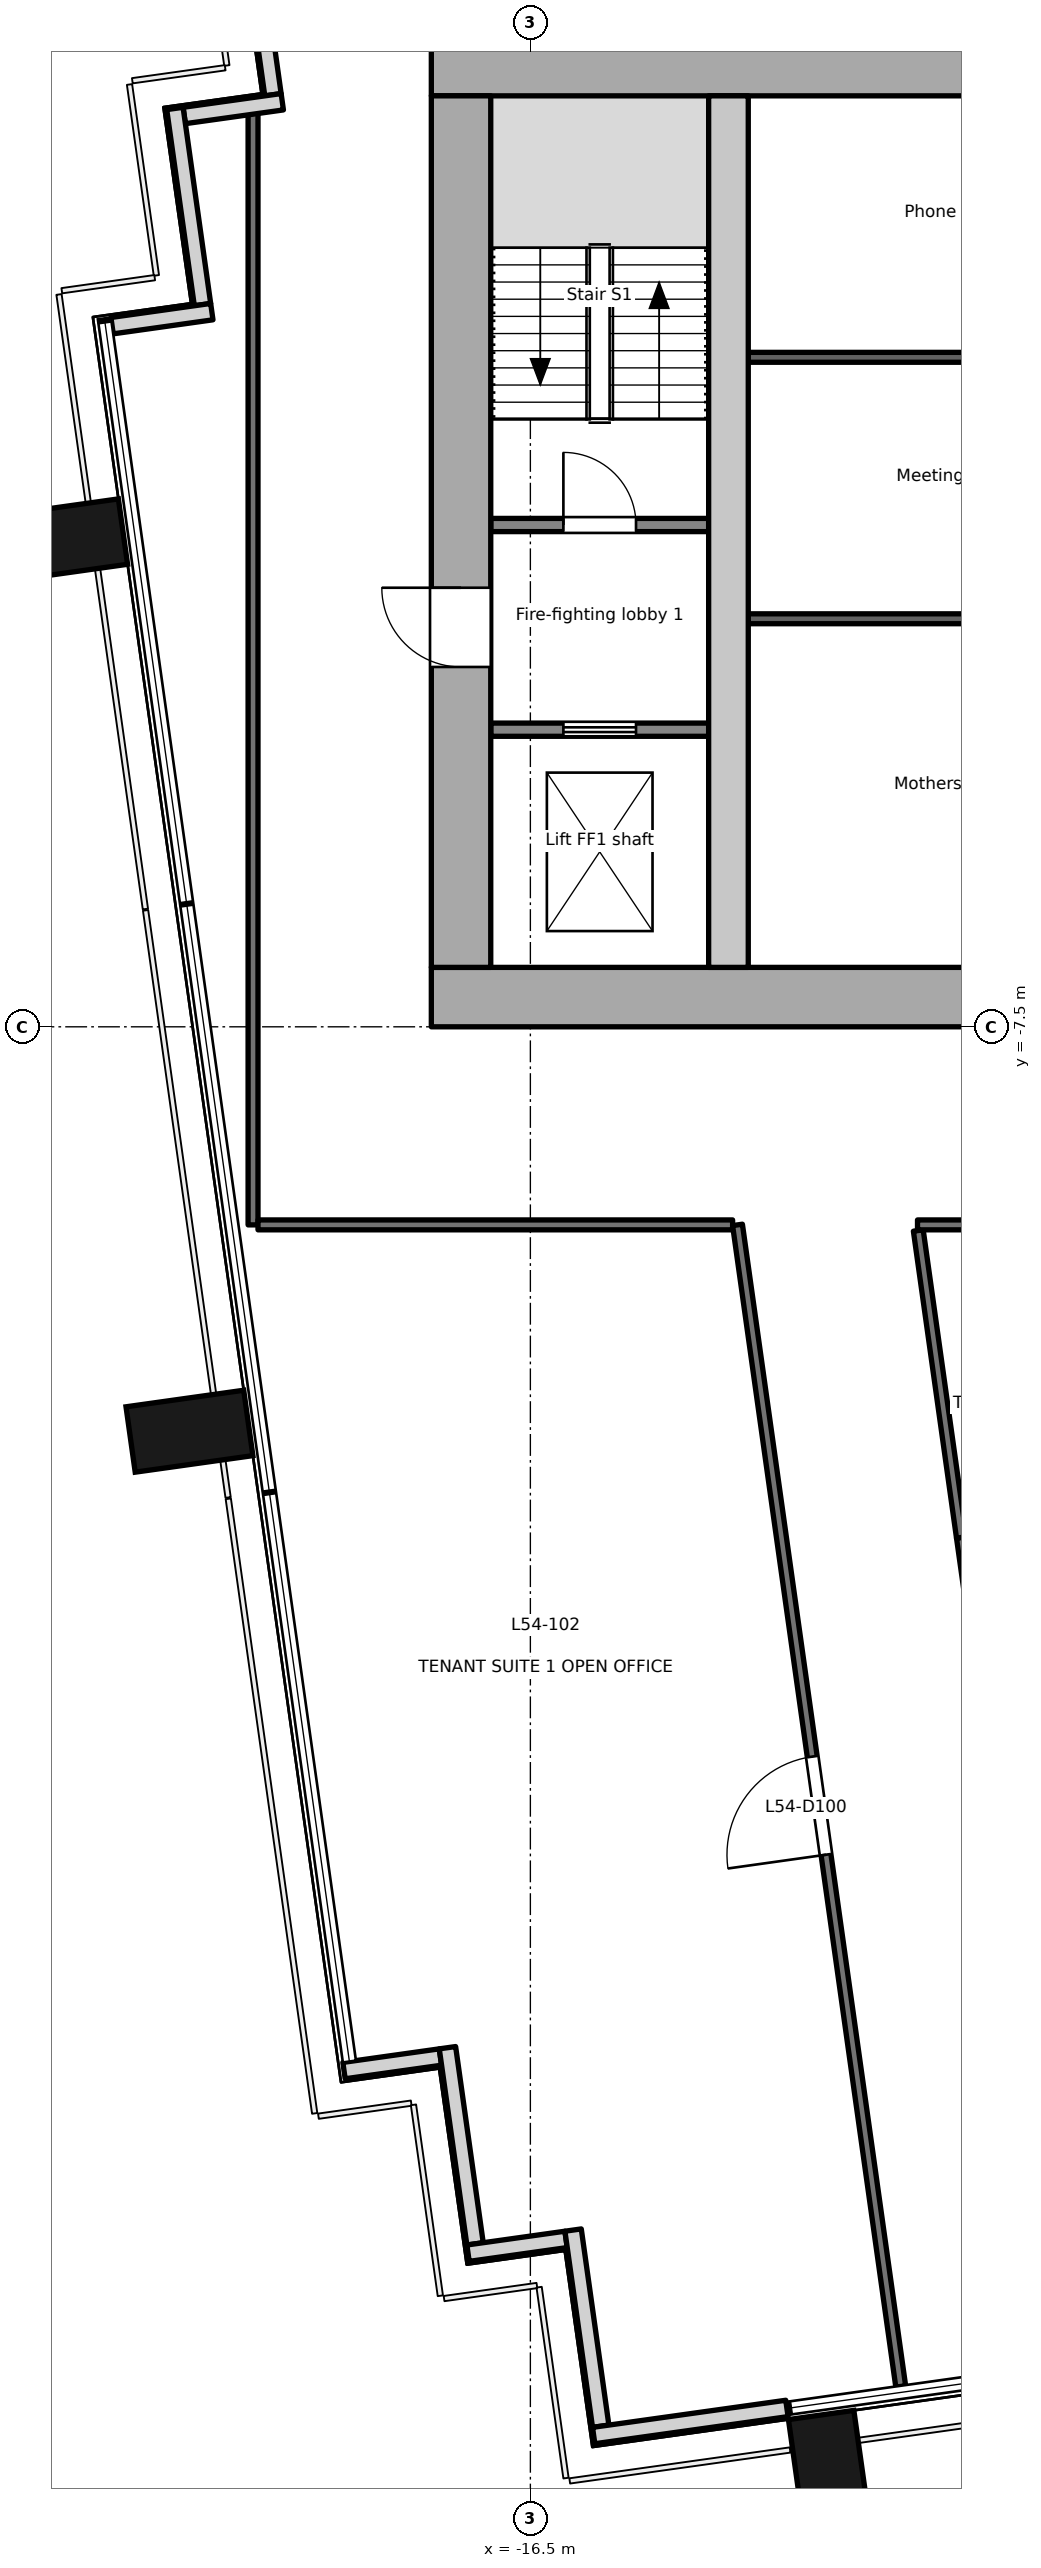
"""IFC4 building model, lengths in metres.
Left out: names, types, materials, properties, quantities, classifications, styles, units other than length and angle.
Written with IfcOpenShell. Run it as: python <this file> out.ifc"""

import sys

from ifc_helpers import new_model, si_unit, direction, frame, frame_2d, origin, origin_2d, place, context, subcontext, project, spatial, rectangle, extrude, element, fill, save


model = new_model("IFC4")
c1 = context("Model", 3, precision=1e-05, world=origin(), true_north=direction((0.0, 1.0)))
c2 = subcontext(c1, "Body", "Model", "MODEL_VIEW")
j1 = project(units=[si_unit("LENGTHUNIT", "METRE"), si_unit("PLANEANGLEUNIT", "RADIAN")], contexts=[c1])
p1 = place(None, origin())
s1 = spatial("IfcSite", under=j1, at=p1, CompositionType="ELEMENT")
p2 = place(p1, origin())
s2 = spatial("IfcBuilding", under=s1, at=p2, CompositionType="ELEMENT")
p3 = place(p2, frame((0.0, 0.0, 236.9)))
s3 = spatial("IfcBuildingStorey", under=s2, at=p3, CompositionType="ELEMENT", Elevation=236.9)
for number, where, z_axis, x_axis in (
    (1, (-11.971, -29.416, -0.2), (0.0, 0.0, 1.0), (0.99, 0.139, 0.0)),
    (2, (-21.663, -13.625, -0.2), (0.0, 0.0, 1.0), (-0.139, 0.99, 0.0)),
    (3, (-23.561, -0.125, -0.2), (0.0, 0.0, 1.0), (-0.139, 0.99, 0.0)),
):
    element("IfcColumn", number, at=place(p3, frame(where, z_axis=z_axis, x_axis=x_axis)), inside=s3, PredefinedType="COLUMN", context=c2, shape_type="SweptSolid", body=[
        extrude(rectangle(XDim=1.0, YDim=1.8, at=origin_2d()), origin(), (0.0, 0.0, 1.0), 3.9),
    ])
p4 = place(p3, frame((-20.815, 9.588, 0.0), z_axis=(0.0, 0.0, 1.0), x_axis=(0.138983028379, -0.9902947631, 0.0)))
e4 = element("IfcWall", 4, at=p4, inside=s3, PredefinedType="SOLIDWALL", context=c2, shape_type="SweptSolid", body=[
    extrude(rectangle(XDim=3.0, YDim=0.25, at=frame_2d((1.5, 0.0))), origin(), (0.0, 0.0, 1.0), 3.7),
])
p5 = place(p3, frame((-20.257, 6.51, 0.0), z_axis=(0.0, 0.0, 1.0), x_axis=(-0.990330117064, -0.138730887823, 0.0)))
e5 = element("IfcWall", 5, at=p5, inside=s3, PredefinedType="SOLIDWALL", context=c2, shape_type="SweptSolid", body=[
    extrude(rectangle(XDim=1.499, YDim=0.25, at=frame_2d((0.75, 0.0))), origin(), (0.0, 0.0, 1.0), 3.7),
])
p6 = place(p3, frame((-21.883, 6.409, 0.0), z_axis=(0.0, 0.0, 1.0), x_axis=(0.139324658755, -0.990246756855, 0.0)))
e6 = element("IfcWall", 6, at=p6, inside=s3, PredefinedType="SOLIDWALL", context=c2, shape_type="SweptSolid", body=[
    extrude(rectangle(XDim=3.0, YDim=0.25, at=frame_2d((1.5, 0.0))), origin(), (0.0, 0.0, 1.0), 3.7),
])
p7 = place(p3, frame((-21.324, 3.332, 0.0), z_axis=(0.0, 0.0, 1.0), x_axis=(-0.990238641016, -0.139382329723, 0.0)))
e7 = element("IfcWall", 7, at=p7, inside=s3, PredefinedType="SOLIDWALL", context=c2, shape_type="SweptSolid", body=[
    extrude(rectangle(XDim=1.526, YDim=0.25, at=frame_2d((0.763, 0.0))), origin(), (0.0, 0.0, 1.0), 3.7),
])
p8 = place(p3, frame((-19.322, -23.309, 0.0), z_axis=(0.0, 0.0, 1.0), x_axis=(0.990235520307, 0.13940449893, 0.0)))
e8 = element("IfcWall", 8, at=p8, inside=s3, PredefinedType="SOLIDWALL", context=c2, shape_type="SweptSolid", body=[
    extrude(rectangle(XDim=1.475, YDim=0.25, at=frame_2d((0.737, 0.0))), origin(), (0.0, 0.0, 1.0), 3.7),
])
p9 = place(p3, frame((-17.756, -22.962, 0.0), z_axis=(0.0, 0.0, 1.0), x_axis=(0.139393225799, -0.990237107263, 0.0)))
e9 = element("IfcWall", 9, at=p9, inside=s3, PredefinedType="SOLIDWALL", context=c2, shape_type="SweptSolid", body=[
    extrude(rectangle(XDim=3.0, YDim=0.25, at=frame_2d((1.5, 0.0))), origin(), (0.0, 0.0, 1.0), 3.7),
])
p10 = place(p3, frame((-17.444, -26.074, 0.0), z_axis=(0.0, 0.0, 1.0), x_axis=(0.990240434918, 0.139369584395, 0.0)))
e10 = element("IfcWall", 10, at=p10, inside=s3, PredefinedType="SOLIDWALL", context=c2, shape_type="SweptSolid", body=[
    extrude(rectangle(XDim=1.5, YDim=0.25, at=frame_2d((0.75, 0.0))), origin(), (0.0, 0.0, 1.0), 3.7),
])
p11 = place(p3, frame((-15.853, -25.724, 0.0), z_axis=(0.0, 0.0, 1.0), x_axis=(0.139302206688, -0.990249915532, 0.0)))
e11 = element("IfcWall", 11, at=p11, inside=s3, PredefinedType="SOLIDWALL", context=c2, shape_type="SweptSolid", body=[
    extrude(rectangle(XDim=3.0, YDim=0.25, at=frame_2d((1.5, 0.0))), origin(), (0.0, 0.0, 1.0), 3.7),
])
p12 = place(p3, frame((-15.541, -28.836, 0.0), z_axis=(0.0, 0.0, 1.0), x_axis=(0.990285396533, 0.139049751574, 0.0)))
e12 = element("IfcWall", 12, at=p12, inside=s3, PredefinedType="SOLIDWALL", context=c2, shape_type="SweptSolid", body=[
    extrude(rectangle(XDim=2.955, YDim=0.25, at=frame_2d((1.478, 0.0))), origin(), (0.0, 0.0, 1.0), 3.7),
])
p13 = place(p3, frame((-18.0, -7.05, -0.2), z_axis=(0.0, 0.0, 1.0), x_axis=(1.0, 0.0, 0.0)))
e13 = element("IfcWall", 13, at=p13, inside=s3, PredefinedType="SHEAR", context=c2, shape_type="SweptSolid", body=[
    extrude(rectangle(XDim=36.0, YDim=0.9, at=frame_2d((18.0, 0.0))), origin(), (0.0, 0.0, 1.0), 3.9),
])
p14 = place(p13, frame((11.3, 0.0, 0.2)))
e14 = element("IfcOpeningElement", 14, at=p14, cuts=e13, PredefinedType="OPENING", context=c2, shape_type="SweptSolid", body=[
    extrude(rectangle(XDim=1.8, YDim=2.1, at=frame_2d((0.9, 1.05))), frame((0.0, 0.46, 0.0), z_axis=(0.0, -1.0, 0.0), x_axis=(1.0, 0.0, 0.0)), (0.0, 0.0, 1.0), 0.921),
])
p15 = place(p13, frame((16.8, 0.0, 0.2)))
e15 = element("IfcOpeningElement", 15, at=p15, cuts=e13, PredefinedType="OPENING", context=c2, shape_type="SweptSolid", body=[
    extrude(rectangle(XDim=2.4, YDim=2.1, at=frame_2d((1.2, 1.05))), frame((0.0, 0.46, 0.0), z_axis=(0.0, -1.0, 0.0), x_axis=(1.0, 0.0, 0.0)), (0.0, 0.0, 1.0), 0.921),
])
p16 = place(p13, frame((26.1, 0.0, 0.2)))
e16 = element("IfcOpeningElement", 16, at=p16, cuts=e13, PredefinedType="OPENING", context=c2, shape_type="SweptSolid", body=[
    extrude(rectangle(XDim=2.4, YDim=2.1, at=frame_2d((1.2, 1.05))), frame((0.0, 0.46, 0.0), z_axis=(0.0, -1.0, 0.0), x_axis=(1.0, 0.0, 0.0)), (0.0, 0.0, 1.0), 0.921),
])
p17 = place(p3, frame((-18.0, 7.05, -0.2), z_axis=(0.0, 0.0, 1.0), x_axis=(1.0, 0.0, 0.0)))
e17 = element("IfcWall", 17, at=p17, inside=s3, PredefinedType="SHEAR", context=c2, shape_type="SweptSolid", body=[
    extrude(rectangle(XDim=36.0, YDim=0.9, at=frame_2d((18.0, 0.0))), origin(), (0.0, 0.0, 1.0), 3.9),
])
p18 = place(p3, frame((-17.55, -6.6, -0.2), z_axis=(0.0, 0.0, 1.0), x_axis=(0.0, 1.0, 0.0)))
e18 = element("IfcWall", 18, at=p18, inside=s3, PredefinedType="SHEAR", context=c2, shape_type="SweptSolid", body=[
    extrude(rectangle(XDim=13.2, YDim=0.9, at=frame_2d((6.6, 0.0))), origin(), (0.0, 0.0, 1.0), 3.9),
])
p19 = place(p18, frame((4.55, 0.0, 0.2)))
e19 = element("IfcOpeningElement", 19, at=p19, cuts=e18, PredefinedType="OPENING", context=c2, shape_type="SweptSolid", body=[
    extrude(rectangle(XDim=1.2, YDim=2.1, at=frame_2d((0.6, 1.05))), frame((0.0, 0.46, 0.0), z_axis=(0.0, -1.0, 0.0), x_axis=(1.0, 0.0, 0.0)), (0.0, 0.0, 1.0), 0.921),
])
p20 = place(p3, frame((-13.5, -6.6, -0.2), z_axis=(0.0, 0.0, 1.0), x_axis=(0.0, 1.0, 0.0)))
e20 = element("IfcWall", 20, at=p20, inside=s3, PredefinedType="SHEAR", context=c2, shape_type="SweptSolid", body=[
    extrude(rectangle(XDim=13.2, YDim=0.6, at=frame_2d((6.6, 0.0))), origin(), (0.0, 0.0, 1.0), 3.9),
])
p21 = place(p3, frame((-17.1, -3.0, 0.0), z_axis=(0.0, 0.0, 1.0), x_axis=(1.0, 0.0, 0.0)))
e21 = element("IfcWall", 21, at=p21, inside=s3, PredefinedType="PARTITIONING", context=c2, shape_type="SweptSolid", body=[
    extrude(rectangle(XDim=3.3, YDim=0.2, at=frame_2d((1.65, 0.0))), origin(), (0.0, 0.0, 1.0), 3.7),
])
p22 = place(p21, frame((1.1, 0.0, 0.0)))
e22 = element("IfcOpeningElement", 22, at=p22, cuts=e21, PredefinedType="OPENING", context=c2, shape_type="SweptSolid", body=[
    extrude(rectangle(XDim=1.1, YDim=2.1, at=frame_2d((0.55, 1.05))), frame((0.0, 0.111, 0.0), z_axis=(0.0, -1.0, 0.0), x_axis=(1.0, 0.0, 0.0)), (0.0, 0.0, 1.0), 0.221),
])
p23 = place(p3, frame((-17.1, 0.1, 0.0), z_axis=(0.0, 0.0, 1.0), x_axis=(1.0, 0.0, 0.0)))
e23 = element("IfcWall", 23, at=p23, inside=s3, PredefinedType="PARTITIONING", context=c2, shape_type="SweptSolid", body=[
    extrude(rectangle(XDim=3.3, YDim=0.2, at=frame_2d((1.65, 0.0))), origin(), (0.0, 0.0, 1.0), 3.7),
])
p24 = place(p23, frame((1.1, 0.0, 0.0)))
e24 = element("IfcOpeningElement", 24, at=p24, cuts=e23, PredefinedType="OPENING", context=c2, shape_type="SweptSolid", body=[
    extrude(rectangle(XDim=1.1, YDim=2.1, at=frame_2d((0.55, 1.05))), frame((0.0, 0.111, 0.0), z_axis=(0.0, -1.0, 0.0), x_axis=(1.0, 0.0, 0.0)), (0.0, 0.0, 1.0), 0.221),
])
for number, where, z_axis, x_axis in (
    (25, (-13.2, -1.32, 0.0), (0.0, 0.0, 1.0), (1.0, 0.0, 0.0)),
    (26, (-13.2, 2.64, 0.0), (0.0, 0.0, 1.0), (1.0, 0.0, 0.0)),
):
    element("IfcWall", number, at=place(p3, frame(where, z_axis=z_axis, x_axis=x_axis)), inside=s3, PredefinedType="PARTITIONING", context=c2, shape_type="SweptSolid", body=[
        extrude(rectangle(XDim=6.25, YDim=0.15, at=frame_2d((3.125, 0.0))), origin(), (0.0, 0.0, 1.0), 3.7),
    ])
p25 = place(p3, frame((-20.7, -10.5, 0.0), z_axis=(0.0, 0.0, 1.0), x_axis=(0.0, 1.0, 0.0)))
e27 = element("IfcWall", 27, at=p25, inside=s3, PredefinedType="PARTITIONING", context=c2, shape_type="SweptSolid", body=[
    extrude(rectangle(XDim=16.856, YDim=0.15, at=frame_2d((8.428, 0.0))), origin(), (0.0, 0.0, 1.0), 3.4),
])
p26 = place(p3, frame((-13.437, -10.5, 0.0), z_axis=(0.0, 0.0, 1.0), x_axis=(-1.0, 0.0, 0.0)))
e28 = element("IfcWall", 28, at=p26, inside=s3, PredefinedType="PARTITIONING", context=c2, shape_type="SweptSolid", body=[
    extrude(rectangle(XDim=7.188, YDim=0.15, at=frame_2d((3.594, 0.0))), origin(), (0.0, 0.0, 1.0), 3.7),
])
p27 = place(p3, frame((-10.891, -28.093, 0.0), z_axis=(0.0, 0.0, 1.0), x_axis=(-0.139139234553, 0.990272827764, 0.0)))
e29 = element("IfcWall", 29, at=p27, inside=s3, PredefinedType="PARTITIONING", context=c2, shape_type="SweptSolid", body=[
    extrude(rectangle(XDim=17.766, YDim=0.15, at=frame_2d((8.883, 0.0))), origin(), (0.0, 0.0, 1.0), 3.7),
])
p28 = place(p27, frame((8.133, 0.0, 0.0)))
e30 = element("IfcOpeningElement", 30, at=p28, cuts=e29, PredefinedType="OPENING", context=c2, shape_type="SweptSolid", body=[
    extrude(rectangle(XDim=1.5, YDim=2.1, at=frame_2d((0.75, 1.05))), frame((0.0, 0.085, 0.0), z_axis=(0.0, -1.0, 0.0), x_axis=(1.0, 0.0, 0.0)), (0.0, 0.0, 1.0), 0.171),
])
p29 = place(p3, frame((-9.972, -15.233, 0.0), z_axis=(0.0, 0.0, 1.0), x_axis=(0.139200531242, -0.990264213279, 0.0)))
e31 = element("IfcWall", 31, at=p29, inside=s3, PredefinedType="PARTITIONING", context=c2, shape_type="SweptSolid", body=[
    extrude(rectangle(XDim=12.607, YDim=0.15, at=frame_2d((6.303, 0.0))), origin(), (0.0, 0.0, 1.0), 2.8),
])
p30 = place(p29, frame((2.901, 0.0, 0.0)))
e32 = element("IfcOpeningElement", 32, at=p30, cuts=e31, PredefinedType="OPENING", context=c2, shape_type="SweptSolid", body=[
    extrude(rectangle(XDim=1.5, YDim=2.1, at=frame_2d((0.75, 1.05))), frame((0.0, 0.085, 0.0), z_axis=(0.0, -1.0, 0.0), x_axis=(1.0, 0.0, 0.0)), (0.0, 0.0, 1.0), 0.171),
])
p31 = place(p3, frame((-10.625, -10.585, 0.0), z_axis=(0.0, 0.0, 1.0), x_axis=(0.139112996275, -0.990276514044, 0.0)))
e33 = element("IfcWall", 33, at=p31, inside=s3, PredefinedType="PARTITIONING", context=c2, shape_type="SweptSolid", body=[
    extrude(rectangle(XDim=4.695, YDim=0.15, at=frame_2d((2.347, 0.0))), origin(), (0.0, 0.0, 1.0), 3.7),
])
p32 = place(p3, frame((-4.557, -10.5, 0.0), z_axis=(0.0, 0.0, 1.0), x_axis=(-1.0, 0.0, 0.0)))
e34 = element("IfcWall", 34, at=p32, inside=s3, PredefinedType="PARTITIONING", context=c2, shape_type="SweptSolid", body=[
    extrude(rectangle(XDim=6.08, YDim=0.15, at=frame_2d((3.04, 0.0))), origin(), (0.0, 0.0, 1.0), 2.8),
])
p33 = place(p22, origin())
e35 = element("IfcDoor", 35, at=p33, inside=s3, OperationType="DOUBLE_DOOR_SLIDING", PredefinedType="DOOR", context=c2, shape_type="SweptSolid", body=[
    extrude(rectangle(XDim=1.1, YDim=2.1, at=frame_2d((0.55, 1.05))), frame((0.0, 0.025, 0.0), z_axis=(0.0, -1.0, 0.0), x_axis=(1.0, 0.0, 0.0)), (0.0, 0.0, 1.0), 0.05),
])
fill(e22, e35)
p34 = place(p19, origin())
e36 = element("IfcDoor", 36, at=p34, inside=s3, OperationType="SINGLE_SWING_RIGHT", PredefinedType="DOOR", context=c2, shape_type="SweptSolid", body=[
    extrude(rectangle(XDim=1.2, YDim=2.1, at=frame_2d((0.6, 1.05))), frame((0.0, 0.025, 0.0), z_axis=(0.0, -1.0, 0.0), x_axis=(1.0, 0.0, 0.0)), (0.0, 0.0, 1.0), 0.05),
])
fill(e19, e36)
p35 = place(p24, origin())
e37 = element("IfcDoor", 37, at=p35, inside=s3, OperationType="SINGLE_SWING_LEFT", PredefinedType="DOOR", context=c2, shape_type="SweptSolid", body=[
    extrude(rectangle(XDim=1.1, YDim=2.1, at=frame_2d((0.55, 1.05))), frame((0.0, 0.025, 0.0), z_axis=(0.0, -1.0, 0.0), x_axis=(1.0, 0.0, 0.0)), (0.0, 0.0, 1.0), 0.05),
])
fill(e24, e37)
p36 = place(p28, origin())
e38 = element("IfcDoor", 38, at=p36, inside=s3, OperationType="DOUBLE_DOOR_SINGLE_SWING", PredefinedType="DOOR", context=c2, shape_type="SweptSolid", body=[
    extrude(rectangle(XDim=1.5, YDim=2.1, at=frame_2d((0.75, 1.05))), frame((0.0, 0.025, 0.0), z_axis=(0.0, -1.0, 0.0), x_axis=(1.0, 0.0, 0.0)), (0.0, 0.0, 1.0), 0.05),
])
fill(e30, e38)
save(model, sys.argv[1])
